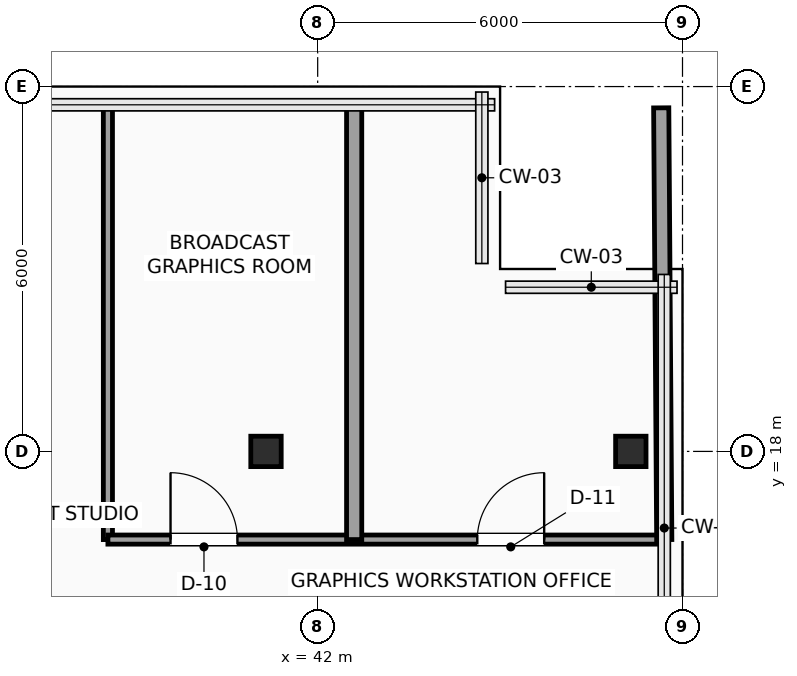
"""IFC4 building model, lengths in metres.
Left out: names, types, materials, properties, quantities, classifications, styles, units other than length and angle.
Written with IfcOpenShell. Run it as: python <this file> out.ifc"""

import sys

from ifc_helpers import new_model, si_unit, direction, frame, frame_2d, origin, origin_2d, place, context, subcontext, project, spatial, rectangle, hollow_rectangle, extrude, element, fill, save


model = new_model("IFC4")
c1 = context("Model", 3, precision=1e-05, world=origin(), true_north=direction((0.0, 1.0)))
c2 = subcontext(c1, "Body", "Model", "MODEL_VIEW")
j1 = project(units=[si_unit("LENGTHUNIT", "METRE"), si_unit("PLANEANGLEUNIT", "RADIAN")], contexts=[c1])
p1 = place(None, origin())
s1 = spatial("IfcSite", under=j1, at=p1, CompositionType="ELEMENT")
p2 = place(p1, origin())
s2 = spatial("IfcBuilding", under=s1, at=p2, CompositionType="ELEMENT")
p3 = place(p2, frame((0.0, 0.0, 130.65)))
s3 = spatial("IfcBuildingStorey", under=s2, at=p3, CompositionType="ELEMENT", Elevation=130.65)
for number, where, z_axis, x_axis in (
    (1, (41.15, 18.0, 0.0), (0.0, 0.0, 1.0), (1.0, 0.0, 0.0)),
    (2, (47.15, 18.0, 0.0), (0.0, 0.0, 1.0), (1.0, 0.0, 0.0)),
):
    element("IfcColumn", number, at=place(p3, frame(where, z_axis=z_axis, x_axis=x_axis)), inside=s3, PredefinedType="COLUMN", context=c2, shape_type="SweptSolid", body=[
        extrude(hollow_rectangle(XDim=0.5, YDim=0.5, WallThickness=0.025, InnerFilletRadius=0.025, OuterFilletRadius=0.04, at=origin_2d()), origin(), (0.0, 0.0, 1.0), 3.75),
    ])
p4 = place(p3, frame((38.55, 23.7, 0.0), z_axis=(0.0, 0.0, 1.0), x_axis=(0.0, -1.0, 0.0)))
e3 = element("IfcWall", 3, at=p4, inside=s3, PredefinedType="PARTITIONING", context=c2, shape_type="SweptSolid", body=[
    extrude(rectangle(XDim=7.15, YDim=0.15, at=frame_2d((3.575, 0.0))), origin(), (0.0, 0.0, 1.0), 3.525),
])
p5 = place(p3, frame((38.55, 16.55, 0.0), z_axis=(0.0, 0.0, 1.0), x_axis=(1.0, 0.0, 0.0)))
e4 = element("IfcWall", 4, at=p5, inside=s3, PredefinedType="PARTITIONING", context=c2, shape_type="SweptSolid", body=[
    extrude(rectangle(XDim=9.15, YDim=0.15, at=frame_2d((4.575, 0.0))), origin(), (0.0, 0.0, 1.0), 3.525),
])
p6 = place(p5, frame((1.03, 0.0, 0.0)))
e5 = element("IfcOpeningElement", 5, at=p6, cuts=e4, PredefinedType="OPENING", context=c2, shape_type="SweptSolid", body=[
    extrude(rectangle(XDim=1.1, YDim=2.25, at=frame_2d((0.55, 1.125))), frame((0.0, 0.085, 0.0), z_axis=(0.0, -1.0, 0.0), x_axis=(1.0, 0.0, 0.0)), (0.0, 0.0, 1.0), 0.17),
])
p7 = place(p5, frame((6.075, 0.0, 0.0)))
e6 = element("IfcOpeningElement", 6, at=p7, cuts=e4, PredefinedType="OPENING", context=c2, shape_type="SweptSolid", body=[
    extrude(rectangle(XDim=1.1, YDim=2.25, at=frame_2d((0.55, 1.125))), frame((0.0, 0.085, 0.0), z_axis=(0.0, -1.0, 0.0), x_axis=(1.0, 0.0, 0.0)), (0.0, 0.0, 1.0), 0.17),
])
p8 = place(p3, frame((42.6, 16.55, 0.0), z_axis=(0.0, 0.0, 1.0), x_axis=(0.0, 1.0, 0.0)))
e7 = element("IfcWall", 7, at=p8, inside=s3, PredefinedType="PARTITIONING", context=c2, shape_type="SweptSolid", body=[
    extrude(rectangle(XDim=7.15, YDim=0.25, at=frame_2d((3.575, 0.0))), origin(), (0.0, 0.0, 1.0), 3.525),
])
p9 = place(p3, frame((47.7, 16.55, 0.0), z_axis=(0.0, 0.0, 1.0), x_axis=(-0.007049101019, 0.999975154779, 0.0)))
e8 = element("IfcWall", 8, at=p9, inside=s3, PredefinedType="PARTITIONING", context=c2, shape_type="SweptSolid", body=[
    extrude(rectangle(XDim=7.1, YDim=0.25, at=frame_2d((3.55, 0.0))), origin(), (0.0, 0.0, 1.0), 3.525),
])
p10 = place(p6, origin())
e9 = element("IfcDoor", 9, at=p10, inside=s3, OperationType="SINGLE_SWING_LEFT", PredefinedType="DOOR", context=c2, shape_type="SweptSolid", body=[
    extrude(rectangle(XDim=1.1, YDim=2.25, at=frame_2d((0.55, 1.125))), frame((0.0, 0.025, 0.0), z_axis=(0.0, -1.0, 0.0), x_axis=(1.0, 0.0, 0.0)), (0.0, 0.0, 1.0), 0.05),
])
fill(e5, e9)
p11 = place(p7, origin())
e10 = element("IfcDoor", 10, at=p11, inside=s3, OperationType="SINGLE_SWING_RIGHT", PredefinedType="DOOR", context=c2, shape_type="SweptSolid", body=[
    extrude(rectangle(XDim=1.1, YDim=2.25, at=frame_2d((0.55, 1.125))), frame((0.0, 0.025, 0.0), z_axis=(0.0, -1.0, 0.0), x_axis=(1.0, 0.0, 0.0)), (0.0, 0.0, 1.0), 0.05),
])
fill(e6, e10)
save(model, sys.argv[1])
